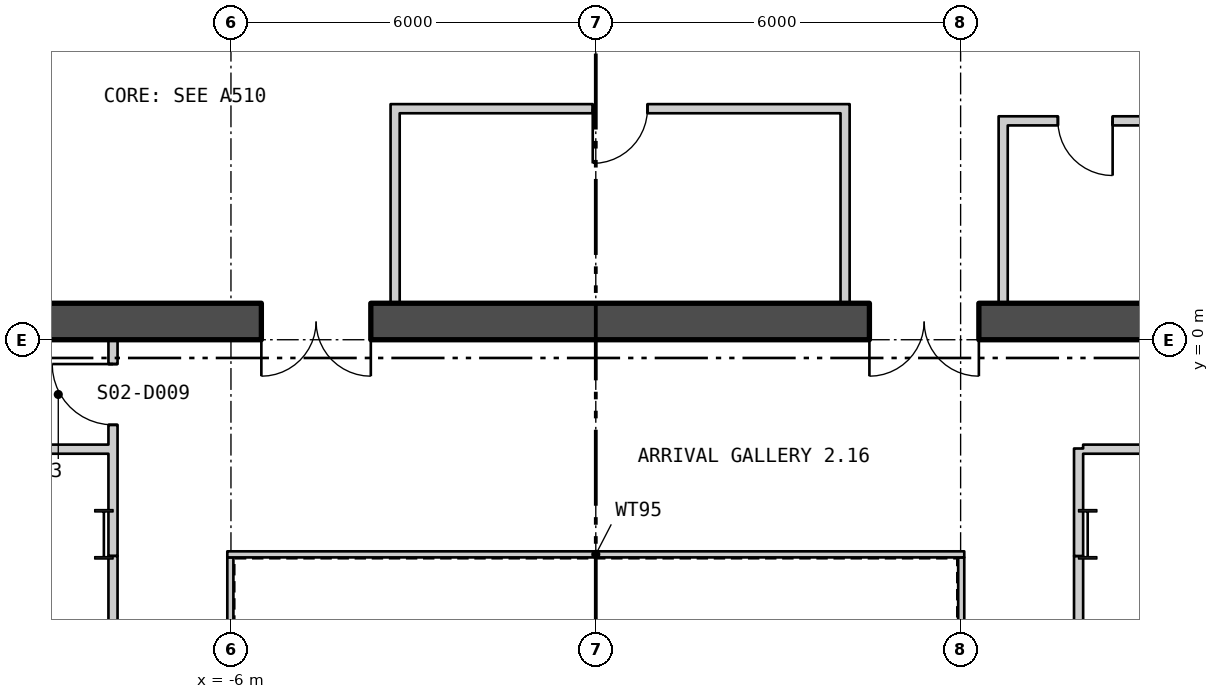
"""IFC4 building model, lengths in metres.
Left out: names, types, materials, properties, quantities, classifications, styles, units other than length and angle.
Written with IfcOpenShell. Run it as: python <this file> out.ifc"""

import sys

from ifc_helpers import new_model, si_unit, direction, frame, frame_2d, origin, origin_2d, place, context, subcontext, project, spatial, polyline, rectangle, i_section, outline, extrude, element, fill, save


model = new_model("IFC4")
c1 = context("Model", 3, precision=1e-05, world=origin(), true_north=direction((0.0, 1.0)))
c2 = subcontext(c1, "Body", "Model", "MODEL_VIEW")
j1 = project(units=[si_unit("LENGTHUNIT", "METRE"), si_unit("PLANEANGLEUNIT", "RADIAN")], contexts=[c1])
p1 = place(None, origin())
s1 = spatial("IfcSite", under=j1, at=p1, CompositionType="ELEMENT")
p2 = place(p1, origin())
s2 = spatial("IfcBuilding", under=s1, at=p2, CompositionType="ELEMENT")
p3 = place(p2, frame((0.0, 0.0, 33.3)))
s3 = spatial("IfcBuildingStorey", under=s2, at=p3, CompositionType="ELEMENT", Elevation=33.3)
for number, where, z_axis, x_axis in (
    (1, (8.09, -3.2, 0.0), (0.0, 0.0, 1.0), (1.0, 0.0, 0.0)),
    (2, (-8.09, -3.2, 0.0), (0.0, 0.0, 1.0), (1.0, 0.0, 0.0)),
):
    element("IfcColumn", number, at=place(p3, frame(where, z_axis=z_axis, x_axis=x_axis)), inside=s3, PredefinedType="COLUMN", context=c2, shape_type="SweptSolid", body=[
        extrude(i_section(OverallWidth=0.303, OverallDepth=0.814, WebThickness=0.021, FlangeThickness=0.04, at=origin_2d()), origin(), (0.0, 0.0, 1.0), 4.5),
    ])
p4 = place(p3, frame((-28.625, 10.015, -0.18), z_axis=(0.0, 0.0, 1.0), x_axis=(0.500000335318, -0.866025210188, 0.0)))
e3 = element("IfcWall", 3, at=p4, inside=s3, PredefinedType="SOLIDWALL", context=c2, shape_type="SweptSolid", body=[
    extrude(outline(polyline([(-0.13, -0.225), (45.88, -0.225), (45.62, 0.225), (0.13, 0.225), (-0.13, -0.225)])), origin(), (0.0, 0.0, 1.0), 4.28),
])
p5 = place(p4, frame((1.425, 0.0, 1.08)))
e4 = element("IfcOpeningElement", 4, at=p5, cuts=e3, PredefinedType="OPENING", context=c2, shape_type="SweptSolid", body=[
    extrude(rectangle(XDim=2.4, YDim=2.6, at=frame_2d((1.2, 1.3))), frame((0.0, 0.235, 0.0), z_axis=(0.0, -1.0, 0.0), x_axis=(1.0, 0.0, 0.0)), (0.0, 0.0, 1.0), 0.47),
])
p6 = place(p4, frame((5.895, 0.0, 1.08)))
e5 = element("IfcOpeningElement", 5, at=p6, cuts=e3, PredefinedType="OPENING", context=c2, shape_type="SweptSolid", body=[
    extrude(rectangle(XDim=2.4, YDim=2.6, at=frame_2d((1.2, 1.3))), frame((0.0, 0.235, 0.0), z_axis=(0.0, -1.0, 0.0), x_axis=(1.0, 0.0, 0.0)), (0.0, 0.0, 1.0), 0.47),
])
p7 = place(p4, frame((10.403, 0.0, 1.08)))
e6 = element("IfcOpeningElement", 6, at=p7, cuts=e3, PredefinedType="OPENING", context=c2, shape_type="SweptSolid", body=[
    extrude(rectangle(XDim=2.4, YDim=2.6, at=frame_2d((1.2, 1.3))), frame((0.0, 0.235, 0.0), z_axis=(0.0, -1.0, 0.0), x_axis=(1.0, 0.0, 0.0)), (0.0, 0.0, 1.0), 0.47),
])
p8 = place(p4, frame((14.912, 0.0, 1.08)))
e7 = element("IfcOpeningElement", 7, at=p8, cuts=e3, PredefinedType="OPENING", context=c2, shape_type="SweptSolid", body=[
    extrude(rectangle(XDim=2.4, YDim=2.6, at=frame_2d((1.2, 1.3))), frame((0.0, 0.235, 0.0), z_axis=(0.0, -1.0, 0.0), x_axis=(1.0, 0.0, 0.0)), (0.0, 0.0, 1.0), 0.47),
])
p9 = place(p4, frame((19.421, 0.0, 1.08)))
e8 = element("IfcOpeningElement", 8, at=p9, cuts=e3, PredefinedType="OPENING", context=c2, shape_type="SweptSolid", body=[
    extrude(rectangle(XDim=2.4, YDim=2.6, at=frame_2d((1.2, 1.3))), frame((0.0, 0.235, 0.0), z_axis=(0.0, -1.0, 0.0), x_axis=(1.0, 0.0, 0.0)), (0.0, 0.0, 1.0), 0.47),
])
p10 = place(p4, frame((23.929, 0.0, 1.08)))
e9 = element("IfcOpeningElement", 9, at=p10, cuts=e3, PredefinedType="OPENING", context=c2, shape_type="SweptSolid", body=[
    extrude(rectangle(XDim=2.4, YDim=2.6, at=frame_2d((1.2, 1.3))), frame((0.0, 0.235, 0.0), z_axis=(0.0, -1.0, 0.0), x_axis=(1.0, 0.0, 0.0)), (0.0, 0.0, 1.0), 0.47),
])
p11 = place(p4, frame((28.438, 0.0, 1.08)))
e10 = element("IfcOpeningElement", 10, at=p11, cuts=e3, PredefinedType="OPENING", context=c2, shape_type="SweptSolid", body=[
    extrude(rectangle(XDim=2.4, YDim=2.6, at=frame_2d((1.2, 1.3))), frame((0.0, 0.235, 0.0), z_axis=(0.0, -1.0, 0.0), x_axis=(1.0, 0.0, 0.0)), (0.0, 0.0, 1.0), 0.47),
])
p12 = place(p4, frame((32.947, 0.0, 1.08)))
e11 = element("IfcOpeningElement", 11, at=p12, cuts=e3, PredefinedType="OPENING", context=c2, shape_type="SweptSolid", body=[
    extrude(rectangle(XDim=2.4, YDim=2.6, at=frame_2d((1.2, 1.3))), frame((0.0, 0.235, 0.0), z_axis=(0.0, -1.0, 0.0), x_axis=(1.0, 0.0, 0.0)), (0.0, 0.0, 1.0), 0.47),
])
p13 = place(p4, frame((37.455, 0.0, 1.08)))
e12 = element("IfcOpeningElement", 12, at=p13, cuts=e3, PredefinedType="OPENING", context=c2, shape_type="SweptSolid", body=[
    extrude(rectangle(XDim=2.4, YDim=2.6, at=frame_2d((1.2, 1.3))), frame((0.0, 0.235, 0.0), z_axis=(0.0, -1.0, 0.0), x_axis=(1.0, 0.0, 0.0)), (0.0, 0.0, 1.0), 0.47),
])
p14 = place(p4, frame((41.925, 0.0, 1.08)))
e13 = element("IfcOpeningElement", 13, at=p14, cuts=e3, PredefinedType="OPENING", context=c2, shape_type="SweptSolid", body=[
    extrude(rectangle(XDim=2.4, YDim=2.6, at=frame_2d((1.2, 1.3))), frame((0.0, 0.235, 0.0), z_axis=(0.0, -1.0, 0.0), x_axis=(1.0, 0.0, 0.0)), (0.0, 0.0, 1.0), 0.47),
])
p15 = place(p3, frame((5.75, -29.605, -0.18), z_axis=(0.0, 0.0, 1.0), x_axis=(0.500000335318, 0.866025210188, 0.0)))
e14 = element("IfcWall", 14, at=p15, inside=s3, PredefinedType="SOLIDWALL", context=c2, shape_type="SweptSolid", body=[
    extrude(outline(polyline([(-0.13, -0.225), (45.88, -0.225), (45.62, 0.225), (0.13, 0.225), (-0.13, -0.225)])), origin(), (0.0, 0.0, 1.0), 4.28),
])
p16 = place(p15, frame((1.425, 0.0, 1.08)))
e15 = element("IfcOpeningElement", 15, at=p16, cuts=e14, PredefinedType="OPENING", context=c2, shape_type="SweptSolid", body=[
    extrude(rectangle(XDim=2.4, YDim=2.6, at=frame_2d((1.2, 1.3))), frame((0.0, 0.235, 0.0), z_axis=(0.0, -1.0, 0.0), x_axis=(1.0, 0.0, 0.0)), (0.0, 0.0, 1.0), 0.47),
])
p17 = place(p15, frame((5.895, 0.0, 1.08)))
e16 = element("IfcOpeningElement", 16, at=p17, cuts=e14, PredefinedType="OPENING", context=c2, shape_type="SweptSolid", body=[
    extrude(rectangle(XDim=2.4, YDim=2.6, at=frame_2d((1.2, 1.3))), frame((0.0, 0.235, 0.0), z_axis=(0.0, -1.0, 0.0), x_axis=(1.0, 0.0, 0.0)), (0.0, 0.0, 1.0), 0.47),
])
p18 = place(p15, frame((10.403, 0.0, 1.08)))
e17 = element("IfcOpeningElement", 17, at=p18, cuts=e14, PredefinedType="OPENING", context=c2, shape_type="SweptSolid", body=[
    extrude(rectangle(XDim=2.4, YDim=2.6, at=frame_2d((1.2, 1.3))), frame((0.0, 0.235, 0.0), z_axis=(0.0, -1.0, 0.0), x_axis=(1.0, 0.0, 0.0)), (0.0, 0.0, 1.0), 0.47),
])
p19 = place(p15, frame((14.912, 0.0, 1.08)))
e18 = element("IfcOpeningElement", 18, at=p19, cuts=e14, PredefinedType="OPENING", context=c2, shape_type="SweptSolid", body=[
    extrude(rectangle(XDim=2.4, YDim=2.6, at=frame_2d((1.2, 1.3))), frame((0.0, 0.235, 0.0), z_axis=(0.0, -1.0, 0.0), x_axis=(1.0, 0.0, 0.0)), (0.0, 0.0, 1.0), 0.47),
])
p20 = place(p15, frame((19.421, 0.0, 1.08)))
e19 = element("IfcOpeningElement", 19, at=p20, cuts=e14, PredefinedType="OPENING", context=c2, shape_type="SweptSolid", body=[
    extrude(rectangle(XDim=2.4, YDim=2.6, at=frame_2d((1.2, 1.3))), frame((0.0, 0.235, 0.0), z_axis=(0.0, -1.0, 0.0), x_axis=(1.0, 0.0, 0.0)), (0.0, 0.0, 1.0), 0.47),
])
p21 = place(p15, frame((23.929, 0.0, 1.08)))
e20 = element("IfcOpeningElement", 20, at=p21, cuts=e14, PredefinedType="OPENING", context=c2, shape_type="SweptSolid", body=[
    extrude(rectangle(XDim=2.4, YDim=2.6, at=frame_2d((1.2, 1.3))), frame((0.0, 0.235, 0.0), z_axis=(0.0, -1.0, 0.0), x_axis=(1.0, 0.0, 0.0)), (0.0, 0.0, 1.0), 0.47),
])
p22 = place(p15, frame((28.438, 0.0, 1.08)))
e21 = element("IfcOpeningElement", 21, at=p22, cuts=e14, PredefinedType="OPENING", context=c2, shape_type="SweptSolid", body=[
    extrude(rectangle(XDim=2.4, YDim=2.6, at=frame_2d((1.2, 1.3))), frame((0.0, 0.235, 0.0), z_axis=(0.0, -1.0, 0.0), x_axis=(1.0, 0.0, 0.0)), (0.0, 0.0, 1.0), 0.47),
])
p23 = place(p15, frame((32.947, 0.0, 1.08)))
e22 = element("IfcOpeningElement", 22, at=p23, cuts=e14, PredefinedType="OPENING", context=c2, shape_type="SweptSolid", body=[
    extrude(rectangle(XDim=2.4, YDim=2.6, at=frame_2d((1.2, 1.3))), frame((0.0, 0.235, 0.0), z_axis=(0.0, -1.0, 0.0), x_axis=(1.0, 0.0, 0.0)), (0.0, 0.0, 1.0), 0.47),
])
p24 = place(p15, frame((37.455, 0.0, 1.08)))
e23 = element("IfcOpeningElement", 23, at=p24, cuts=e14, PredefinedType="OPENING", context=c2, shape_type="SweptSolid", body=[
    extrude(rectangle(XDim=2.4, YDim=2.6, at=frame_2d((1.2, 1.3))), frame((0.0, 0.235, 0.0), z_axis=(0.0, -1.0, 0.0), x_axis=(1.0, 0.0, 0.0)), (0.0, 0.0, 1.0), 0.47),
])
p25 = place(p15, frame((41.925, 0.0, 1.08)))
e24 = element("IfcOpeningElement", 24, at=p25, cuts=e14, PredefinedType="OPENING", context=c2, shape_type="SweptSolid", body=[
    extrude(rectangle(XDim=2.4, YDim=2.6, at=frame_2d((1.2, 1.3))), frame((0.0, 0.235, 0.0), z_axis=(0.0, -1.0, 0.0), x_axis=(1.0, 0.0, 0.0)), (0.0, 0.0, 1.0), 0.47),
])
p26 = place(p3, frame((6.01, -11.62, 0.0), z_axis=(0.0, 0.0, 1.0), x_axis=(0.0, 1.0, 0.0)))
e25 = element("IfcWall", 25, at=p26, inside=s3, PredefinedType="PARTITIONING", context=c2, shape_type="SweptSolid", body=[
    extrude(rectangle(XDim=8.04, YDim=0.1, at=frame_2d((4.02, 0.0))), origin(), (0.0, 0.0, 1.0), 4.3),
])
p27 = place(p3, frame((6.06, -3.53, 0.0), z_axis=(0.0, 0.0, 1.0), x_axis=(-1.0, 0.0, 0.0)))
e26 = element("IfcWall", 26, at=p27, inside=s3, PredefinedType="PARTITIONING", context=c2, shape_type="SweptSolid", body=[
    extrude(rectangle(XDim=12.12, YDim=0.1, at=frame_2d((6.06, 0.0))), origin(), (0.0, 0.0, 1.0), 4.3),
])
p28 = place(p3, frame((-6.01, -3.58, 0.0), z_axis=(0.0, 0.0, 1.0), x_axis=(0.0, -1.0, 0.0)))
e27 = element("IfcWall", 27, at=p28, inside=s3, PredefinedType="PARTITIONING", context=c2, shape_type="SweptSolid", body=[
    extrude(rectangle(XDim=8.04, YDim=0.1, at=frame_2d((4.02, 0.0))), origin(), (0.0, 0.0, 1.0), 4.3),
])
p29 = place(p3, frame((-17.5, 0.3, 0.0), z_axis=(0.0, 0.0, 1.0), x_axis=(1.0, 0.0, 0.0)))
e28 = element("IfcWall", 28, at=p29, inside=s3, PredefinedType="SHEAR", context=c2, shape_type="SweptSolid", body=[
    extrude(rectangle(XDim=35.0, YDim=0.6, at=frame_2d((17.5, 0.0))), origin(), (0.0, 0.0, 1.0), 4.3),
])
p30 = place(p29, frame((12.0, 0.0, 0.0)))
e29 = element("IfcOpeningElement", 29, at=p30, cuts=e28, PredefinedType="OPENING", context=c2, shape_type="SweptSolid", body=[
    extrude(rectangle(XDim=1.8, YDim=2.4, at=frame_2d((0.9, 1.2))), frame((0.0, 0.31, 0.0), z_axis=(0.0, -1.0, 0.0), x_axis=(1.0, 0.0, 0.0)), (0.0, 0.0, 1.0), 0.62),
])
p31 = place(p29, frame((22.0, 0.0, 0.0)))
e30 = element("IfcOpeningElement", 30, at=p31, cuts=e28, PredefinedType="OPENING", context=c2, shape_type="SweptSolid", body=[
    extrude(rectangle(XDim=1.8, YDim=2.4, at=frame_2d((0.9, 1.2))), frame((0.0, 0.31, 0.0), z_axis=(0.0, -1.0, 0.0), x_axis=(1.0, 0.0, 0.0)), (0.0, 0.0, 1.0), 0.62),
])
for number, where, z_axis, x_axis in (
    (31, (-3.3, 0.6, 0.0), (0.0, 0.0, 1.0), (0.0, 1.0, 0.0)),
    (32, (4.1, 0.6, 0.0), (0.0, 0.0, 1.0), (0.0, 1.0, 0.0)),
):
    element("IfcWall", number, at=place(p3, frame(where, z_axis=z_axis, x_axis=x_axis)), inside=s3, PredefinedType="PARTITIONING", context=c2, shape_type="SweptSolid", body=[
        extrude(rectangle(XDim=3.275, YDim=0.15, at=frame_2d((1.637, 0.0))), origin(), (0.0, 0.0, 1.0), 4.3),
    ])
p32 = place(p3, frame((-3.225, 3.8, 0.0), z_axis=(0.0, 0.0, 1.0), x_axis=(1.0, 0.0, 0.0)))
e33 = element("IfcWall", 33, at=p32, inside=s3, PredefinedType="PARTITIONING", context=c2, shape_type="SweptSolid", body=[
    extrude(rectangle(XDim=7.25, YDim=0.15, at=frame_2d((3.625, 0.0))), origin(), (0.0, 0.0, 1.0), 4.3),
])
p33 = place(p32, frame((3.175, 0.0, 0.0)))
e34 = element("IfcOpeningElement", 34, at=p33, cuts=e33, PredefinedType="OPENING", context=c2, shape_type="SweptSolid", body=[
    extrude(rectangle(XDim=0.9, YDim=2.1, at=frame_2d((0.45, 1.05))), frame((0.0, 0.085, 0.0), z_axis=(0.0, -1.0, 0.0), x_axis=(1.0, 0.0, 0.0)), (0.0, 0.0, 1.0), 0.17),
])
p34 = place(p3, frame((6.7, 0.6, 0.0), z_axis=(0.0, 0.0, 1.0), x_axis=(0.0, 1.0, 0.0)))
e35 = element("IfcWall", 35, at=p34, inside=s3, PredefinedType="PARTITIONING", context=c2, shape_type="SweptSolid", body=[
    extrude(rectangle(XDim=3.075, YDim=0.15, at=frame_2d((1.538, 0.0))), origin(), (0.0, 0.0, 1.0), 4.3),
])
p35 = place(p3, frame((6.775, 3.6, 0.0), z_axis=(0.0, 0.0, 1.0), x_axis=(1.0, 0.0, 0.0)))
e36 = element("IfcWall", 36, at=p35, inside=s3, PredefinedType="PARTITIONING", context=c2, shape_type="SweptSolid", body=[
    extrude(rectangle(XDim=2.55, YDim=0.15, at=frame_2d((1.275, 0.0))), origin(), (0.0, 0.0, 1.0), 4.3),
])
p36 = place(p35, frame((0.825, 0.0, 0.0)))
e37 = element("IfcOpeningElement", 37, at=p36, cuts=e36, PredefinedType="OPENING", context=c2, shape_type="SweptSolid", body=[
    extrude(rectangle(XDim=0.9, YDim=2.1, at=frame_2d((0.45, 1.05))), frame((0.0, 0.085, 0.0), z_axis=(0.0, -1.0, 0.0), x_axis=(1.0, 0.0, 0.0)), (0.0, 0.0, 1.0), 0.17),
])
p37 = place(p3, frame((-19.225, -1.8, 0.0), z_axis=(0.0, 0.0, 1.0), x_axis=(1.0, 0.0, 0.0)))
e38 = element("IfcWall", 38, at=p37, inside=s3, PredefinedType="PARTITIONING", context=c2, shape_type="SweptSolid", body=[
    extrude(rectangle(XDim=11.21, YDim=0.15, at=frame_2d((5.605, 0.0))), origin(), (0.0, 0.0, 1.0), 4.3),
])
p38 = place(p37, frame((3.559, 0.0, 0.0)))
e39 = element("IfcOpeningElement", 39, at=p38, cuts=e38, PredefinedType="OPENING", context=c2, shape_type="SweptSolid", body=[
    extrude(rectangle(XDim=1.0, YDim=2.1, at=frame_2d((0.5, 1.05))), frame((0.0, 0.085, 0.0), z_axis=(0.0, -1.0, 0.0), x_axis=(1.0, 0.0, 0.0)), (0.0, 0.0, 1.0), 0.17),
])
p39 = place(p3, frame((-7.94, -13.675, 0.0), z_axis=(0.0, 0.0, 1.0), x_axis=(0.0, 1.0, 0.0)))
e40 = element("IfcWall", 40, at=p39, inside=s3, PredefinedType="PARTITIONING", context=c2, shape_type="SweptSolid", body=[
    extrude(rectangle(XDim=10.118, YDim=0.15, at=frame_2d((5.059, 0.0))), origin(), (0.0, 0.0, 1.0), 3.61),
])
p40 = place(p3, frame((-7.94, -3.557, 0.0), z_axis=(0.0, 0.0, 1.0), x_axis=(0.0, 1.0, 0.0)))
e41 = element("IfcWall", 41, at=p40, inside=s3, PredefinedType="PARTITIONING", context=c2, shape_type="SweptSolid", body=[
    extrude(rectangle(XDim=3.557, YDim=0.15, at=frame_2d((1.778, 0.0))), origin(), (0.0, 0.0, 1.0), 4.3),
])
p41 = place(p40, frame((2.157, 0.0, 0.0)))
e42 = element("IfcOpeningElement", 42, at=p41, cuts=e41, PredefinedType="OPENING", context=c2, shape_type="SweptSolid", body=[
    extrude(rectangle(XDim=1.0, YDim=2.1, at=frame_2d((0.5, 1.05))), frame((0.0, 0.085, 0.0), z_axis=(0.0, -1.0, 0.0), x_axis=(1.0, 0.0, 0.0)), (0.0, 0.0, 1.0), 0.17),
])
p42 = place(p3, frame((7.94, -13.675, 0.0), z_axis=(0.0, 0.0, 1.0), x_axis=(0.0, 1.0, 0.0)))
e43 = element("IfcWall", 43, at=p42, inside=s3, PredefinedType="PARTITIONING", context=c2, shape_type="SweptSolid", body=[
    extrude(rectangle(XDim=10.118, YDim=0.15, at=frame_2d((5.059, 0.0))), origin(), (0.0, 0.0, 1.0), 3.61),
])
p43 = place(p42, frame((4.581, 0.0, 0.0)))
e44 = element("IfcOpeningElement", 44, at=p43, cuts=e43, PredefinedType="OPENING", context=c2, shape_type="SweptSolid", body=[
    extrude(rectangle(XDim=1.0, YDim=2.1, at=frame_2d((0.5, 1.05))), frame((0.0, 0.085, 0.0), z_axis=(0.0, -1.0, 0.0), x_axis=(1.0, 0.0, 0.0)), (0.0, 0.0, 1.0), 0.17),
])
p44 = place(p3, frame((7.94, -3.557, 0.0), z_axis=(0.0, 0.0, 1.0), x_axis=(0.0, 1.0, 0.0)))
e45 = element("IfcWall", 45, at=p44, inside=s3, PredefinedType="PARTITIONING", context=c2, shape_type="SweptSolid", body=[
    extrude(rectangle(XDim=1.768, YDim=0.15, at=frame_2d((0.884, 0.0))), origin(), (0.0, 0.0, 1.0), 4.3),
])
p45 = place(p3, frame((8.015, -1.8, 0.0), z_axis=(0.0, 0.0, 1.0), x_axis=(1.0, 0.0, 0.0)))
e46 = element("IfcWall", 46, at=p45, inside=s3, PredefinedType="PARTITIONING", context=c2, shape_type="SweptSolid", body=[
    extrude(rectangle(XDim=11.21, YDim=0.15, at=frame_2d((5.605, 0.0))), origin(), (0.0, 0.0, 1.0), 4.3),
])
p46 = place(p33, origin())
e47 = element("IfcDoor", 47, at=p46, inside=s3, OperationType="SINGLE_SWING_LEFT", PredefinedType="DOOR", context=c2, shape_type="SweptSolid", body=[
    extrude(rectangle(XDim=0.9, YDim=2.1, at=frame_2d((0.45, 1.05))), frame((0.0, 0.025, 0.0), z_axis=(0.0, -1.0, 0.0), x_axis=(1.0, 0.0, 0.0)), (0.0, 0.0, 1.0), 0.05),
])
fill(e34, e47)
p47 = place(p36, origin())
e48 = element("IfcDoor", 48, at=p47, inside=s3, OperationType="SINGLE_SWING_RIGHT", PredefinedType="DOOR", context=c2, shape_type="SweptSolid", body=[
    extrude(rectangle(XDim=0.9, YDim=2.1, at=frame_2d((0.45, 1.05))), frame((0.0, 0.025, 0.0), z_axis=(0.0, -1.0, 0.0), x_axis=(1.0, 0.0, 0.0)), (0.0, 0.0, 1.0), 0.05),
])
fill(e37, e48)
p48 = place(p30, origin())
e49 = element("IfcDoor", 49, at=p48, inside=s3, OperationType="DOUBLE_DOOR_SINGLE_SWING", PredefinedType="DOOR", context=c2, shape_type="SweptSolid", body=[
    extrude(rectangle(XDim=1.8, YDim=2.4, at=frame_2d((0.9, 1.2))), frame((0.0, 0.025, 0.0), z_axis=(0.0, -1.0, 0.0), x_axis=(1.0, 0.0, 0.0)), (0.0, 0.0, 1.0), 0.05),
])
fill(e29, e49)
p49 = place(p31, origin())
e50 = element("IfcDoor", 50, at=p49, inside=s3, OperationType="DOUBLE_DOOR_SINGLE_SWING", PredefinedType="DOOR", context=c2, shape_type="SweptSolid", body=[
    extrude(rectangle(XDim=1.8, YDim=2.4, at=frame_2d((0.9, 1.2))), frame((0.0, 0.025, 0.0), z_axis=(0.0, -1.0, 0.0), x_axis=(1.0, 0.0, 0.0)), (0.0, 0.0, 1.0), 0.05),
])
fill(e30, e50)
p50 = place(p41, origin())
e51 = element("IfcDoor", 51, at=p50, inside=s3, OperationType="SINGLE_SWING_LEFT", PredefinedType="DOOR", context=c2, shape_type="SweptSolid", body=[
    extrude(rectangle(XDim=1.0, YDim=2.1, at=frame_2d((0.5, 1.05))), frame((0.0, 0.025, 0.0), z_axis=(0.0, -1.0, 0.0), x_axis=(1.0, 0.0, 0.0)), (0.0, 0.0, 1.0), 0.05),
])
fill(e42, e51)
save(model, sys.argv[1])
